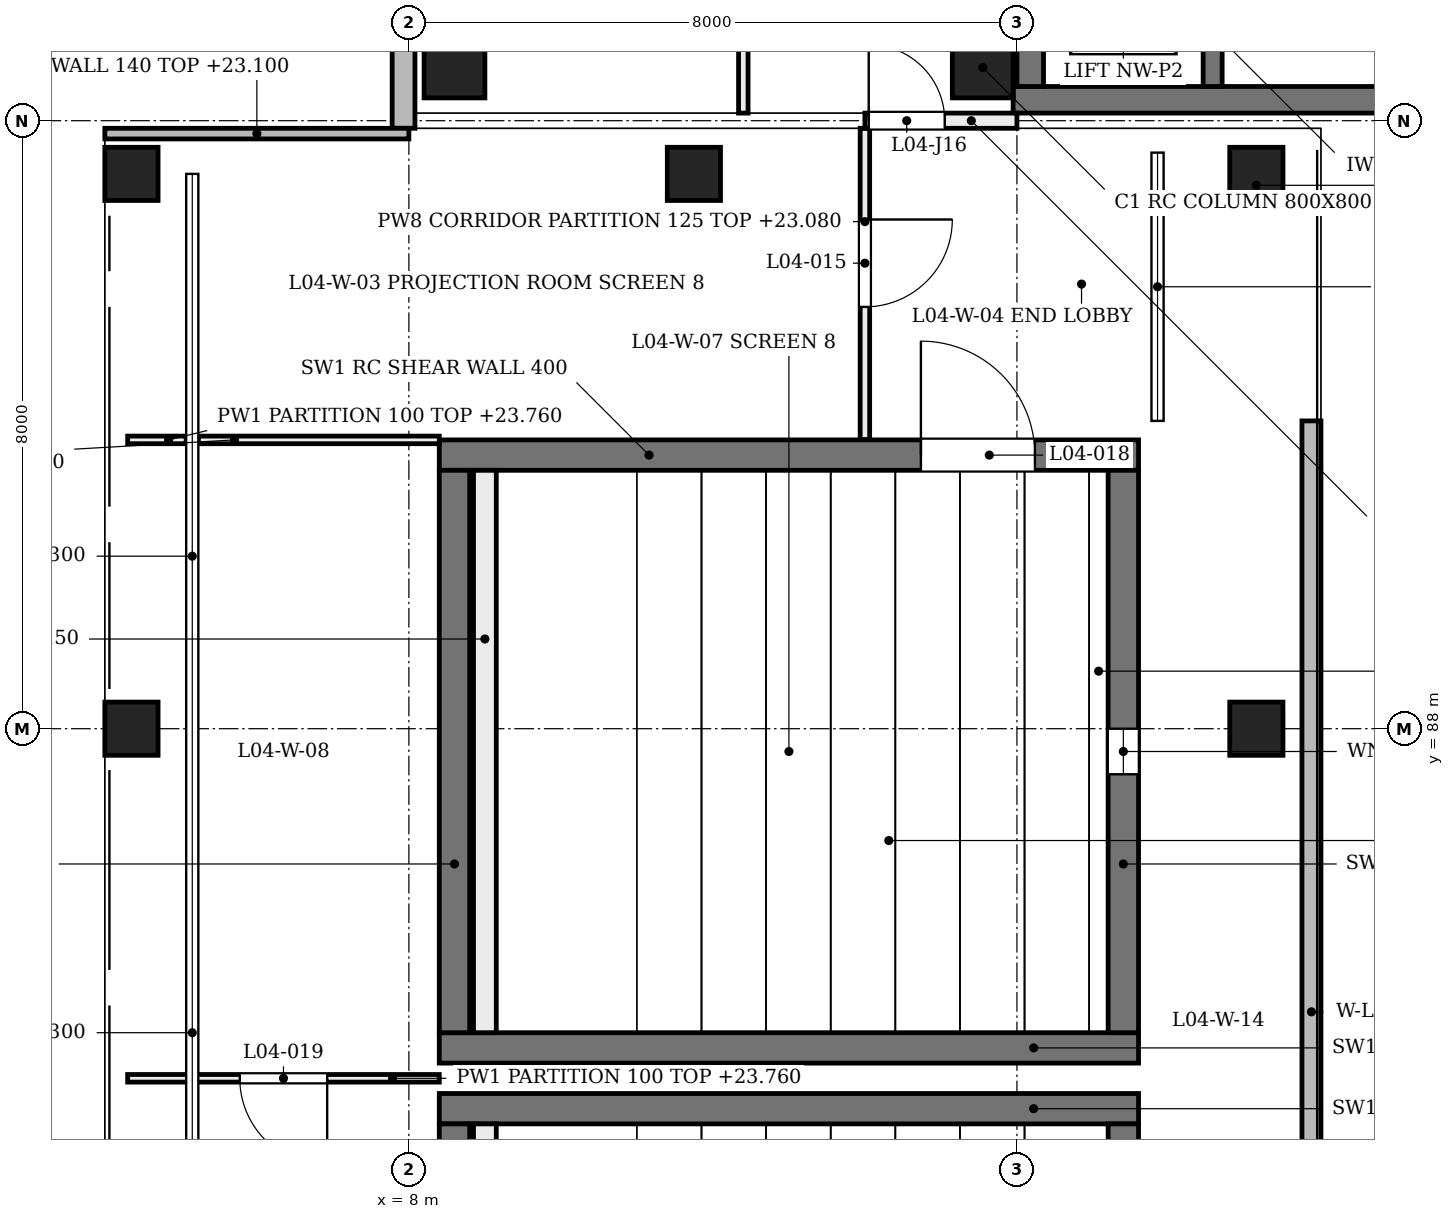
"""IFC4 building model, lengths in metres.
Left out: names, types, materials, properties, quantities, classifications, styles, units other than length and angle.
Written with IfcOpenShell. Run it as: python <this file> out.ifc"""

import sys

from ifc_helpers import new_model, si_unit, direction, frame, frame_2d, origin, origin_2d, place, context, subcontext, project, spatial, rectangle, extrude, element, fill, save


model = new_model("IFC4")
c1 = context("Model", 3, precision=1e-05, world=origin(), true_north=direction((0.0, 1.0)))
c2 = subcontext(c1, "Body", "Model", "MODEL_VIEW")
j1 = project(units=[si_unit("LENGTHUNIT", "METRE"), si_unit("PLANEANGLEUNIT", "RADIAN")], contexts=[c1])
p1 = place(None, origin())
s1 = spatial("IfcSite", under=j1, at=p1, CompositionType="ELEMENT")
p2 = place(p1, origin())
s2 = spatial("IfcBuilding", under=s1, at=p2, CompositionType="ELEMENT")
p3 = place(p2, frame((0.0, 0.0, 19.2)))
s3 = spatial("IfcBuildingStorey", under=s2, at=p3, CompositionType="ELEMENT", Elevation=19.2)
p4 = place(p3, frame((8.4, 83.0, 0.0), z_axis=(0.0, 0.0, 1.0), x_axis=(1.0, 0.0, 0.0)))
e1 = element("IfcWall", 1, at=p4, inside=s3, PredefinedType="SHEAR", context=c2, shape_type="SweptSolid", body=[
    extrude(rectangle(XDim=9.2, YDim=0.4, at=frame_2d((4.6, 0.0))), origin(), (0.0, 0.0, 1.0), 4.58),
])
p5 = place(p3, frame((8.6, 75.8, 0.0), z_axis=(0.0, 0.0, 1.0), x_axis=(0.0, 1.0, 0.0)))
e2 = element("IfcWall", 2, at=p5, inside=s3, PredefinedType="SHEAR", context=c2, shape_type="SweptSolid", body=[
    extrude(rectangle(XDim=7.0, YDim=0.4, at=frame_2d((3.5, 0.0))), origin(), (0.0, 0.0, 1.0), 4.58),
])
p6 = place(p3, frame((17.4, 75.8, 0.0), z_axis=(0.0, 0.0, 1.0), x_axis=(0.0, 1.0, 0.0)))
e3 = element("IfcWall", 3, at=p6, inside=s3, PredefinedType="SHEAR", context=c2, shape_type="SweptSolid", body=[
    extrude(rectangle(XDim=7.0, YDim=0.4, at=frame_2d((3.5, 0.0))), origin(), (0.0, 0.0, 1.0), 4.58),
])
p7 = place(p6, frame((2.252, 0.0, 0.0)))
e4 = element("IfcOpeningElement", 4, at=p7, cuts=e3, PredefinedType="OPENING", context=c2, shape_type="SweptSolid", body=[
    extrude(rectangle(XDim=1.5, YDim=2.1, at=frame_2d((0.75, 1.05))), frame((0.0, 0.21, 0.0), z_axis=(0.0, -1.0, 0.0), x_axis=(1.0, 0.0, 0.0)), (0.0, 0.0, 1.0), 0.42),
])
p8 = place(p6, frame((3.2, 0.0, 3.72)))
e5 = element("IfcOpeningElement", 5, at=p8, cuts=e3, PredefinedType="OPENING", context=c2, shape_type="SweptSolid", body=[
    extrude(rectangle(XDim=0.6, YDim=0.5, at=frame_2d((0.3, 0.25))), frame((0.0, 0.21, 0.0), z_axis=(0.0, -1.0, 0.0), x_axis=(1.0, 0.0, 0.0)), (0.0, 0.0, 1.0), 0.42),
])
p9 = place(p3, frame((8.4, 83.8, 0.0), z_axis=(0.0, 0.0, 1.0), x_axis=(1.0, 0.0, 0.0)))
e6 = element("IfcWall", 6, at=p9, inside=s3, PredefinedType="SHEAR", context=c2, shape_type="SweptSolid", body=[
    extrude(rectangle(XDim=9.2, YDim=0.4, at=frame_2d((4.6, 0.0))), origin(), (0.0, 0.0, 1.0), 4.58),
])
p10 = place(p3, frame((8.4, 91.6, 0.0), z_axis=(0.0, 0.0, 1.0), x_axis=(1.0, 0.0, 0.0)))
e7 = element("IfcWall", 7, at=p10, inside=s3, PredefinedType="SHEAR", context=c2, shape_type="SweptSolid", body=[
    extrude(rectangle(XDim=9.2, YDim=0.4, at=frame_2d((4.6, 0.0))), origin(), (0.0, 0.0, 1.0), 4.58),
])
p11 = place(p10, frame((6.337, 0.0, 0.0)))
e8 = element("IfcOpeningElement", 8, at=p11, cuts=e7, PredefinedType="OPENING", context=c2, shape_type="SweptSolid", body=[
    extrude(rectangle(XDim=1.5, YDim=2.1, at=frame_2d((0.75, 1.05))), frame((0.0, 0.21, 0.0), z_axis=(0.0, -1.0, 0.0), x_axis=(1.0, 0.0, 0.0)), (0.0, 0.0, 1.0), 0.42),
])
p12 = place(p3, frame((8.6, 84.0, 0.0), z_axis=(0.0, 0.0, 1.0), x_axis=(0.0, 1.0, 0.0)))
e9 = element("IfcWall", 9, at=p12, inside=s3, PredefinedType="SHEAR", context=c2, shape_type="SweptSolid", body=[
    extrude(rectangle(XDim=7.4, YDim=0.4, at=frame_2d((3.7, 0.0))), origin(), (0.0, 0.0, 1.0), 4.58),
])
p13 = place(p3, frame((17.4, 84.0, 0.0), z_axis=(0.0, 0.0, 1.0), x_axis=(0.0, 1.0, 0.0)))
e10 = element("IfcWall", 10, at=p13, inside=s3, PredefinedType="SHEAR", context=c2, shape_type="SweptSolid", body=[
    extrude(rectangle(XDim=7.4, YDim=0.4, at=frame_2d((3.7, 0.0))), origin(), (0.0, 0.0, 1.0), 4.58),
])
p14 = place(p13, frame((3.4, 0.0, 3.88)))
e11 = element("IfcOpeningElement", 11, at=p14, cuts=e10, PredefinedType="OPENING", context=c2, shape_type="SweptSolid", body=[
    extrude(rectangle(XDim=0.6, YDim=0.5, at=frame_2d((0.3, 0.25))), frame((0.0, 0.21, 0.0), z_axis=(0.0, -1.0, 0.0), x_axis=(1.0, 0.0, 0.0)), (0.0, 0.0, 1.0), 0.42),
])
p15 = place(p3, frame((15.95, 96.275, 0.0), z_axis=(0.0, 0.0, 1.0), x_axis=(1.0, 0.0, 0.0)))
e12 = element("IfcWall", 12, at=p15, inside=s3, PredefinedType="SHEAR", context=c2, shape_type="SweptSolid", body=[
    extrude(rectangle(XDim=7.95, YDim=0.35, at=frame_2d((3.975, 0.0))), origin(), (0.0, 0.0, 1.0), 4.58),
])
p16 = place(p3, frame((16.175, 96.45, 0.0), z_axis=(0.0, 0.0, 1.0), x_axis=(0.0, 1.0, 0.0)))
e13 = element("IfcWall", 13, at=p16, inside=s3, PredefinedType="SHEAR", context=c2, shape_type="SweptSolid", body=[
    extrude(rectangle(XDim=15.2, YDim=0.35, at=frame_2d((7.6, 0.0))), origin(), (0.0, 0.0, 1.0), 4.58),
])
p17 = place(p16, frame((13.25, 0.0, 0.0)))
e14 = element("IfcOpeningElement", 14, at=p17, cuts=e13, PredefinedType="OPENING", context=c2, shape_type="SweptSolid", body=[
    extrude(rectangle(XDim=1.0, YDim=2.1, at=frame_2d((0.5, 1.05))), frame((0.0, 0.185, 0.0), z_axis=(0.0, -1.0, 0.0), x_axis=(1.0, 0.0, 0.0)), (0.0, 0.0, 1.0), 0.37),
])
p18 = place(p16, frame((3.2, 0.0, 0.0)))
e15 = element("IfcOpeningElement", 15, at=p18, cuts=e13, PredefinedType="OPENING", context=c2, shape_type="SweptSolid", body=[
    extrude(rectangle(XDim=1.4, YDim=2.1, at=frame_2d((0.7, 1.05))), frame((0.0, 0.185, 0.0), z_axis=(0.0, -1.0, 0.0), x_axis=(1.0, 0.0, 0.0)), (0.0, 0.0, 1.0), 0.37),
])
for number, where, z_axis, x_axis in (
    (16, (8.6, 96.7, 0.0), (0.0, 0.0, 1.0), (1.0, 0.0, 0.0)),
    (17, (15.55, 96.7, 0.0), (0.0, 0.0, 1.0), (1.0, 0.0, 0.0)),
):
    element("IfcColumn", number, at=place(p3, frame(where, z_axis=z_axis, x_axis=x_axis)), inside=s3, PredefinedType="COLUMN", context=c2, shape_type="SweptSolid", body=[
        extrude(rectangle(XDim=0.8, YDim=0.8, at=origin_2d()), origin(), (0.0, 0.0, 1.0), 4.8),
    ])
for number, where, z_axis, x_axis in (
    (18, (4.6, 88.0, 0.0), (-0.204, 0.0, 0.979), (0.0, -1.0, 0.0)),
    (19, (4.6, 95.3, 0.0), (-0.204, 0.0, 0.979), (0.0, -1.0, 0.0)),
    (20, (12.0, 95.3, 0.0), (-0.204, 0.0, 0.979), (0.0, -1.0, 0.0)),
    (21, (19.4, 88.0, 0.0), (-0.204, 0.0, 0.979), (0.0, -1.0, 0.0)),
    (22, (19.4, 95.3, 0.0), (-0.204, 0.0, 0.979), (0.0, -1.0, 0.0)),
):
    element("IfcColumn", number, at=place(p3, frame(where, z_axis=z_axis, x_axis=x_axis)), inside=s3, PredefinedType="COLUMN", context=c2, shape_type="SweptSolid", body=[
        extrude(rectangle(XDim=0.7, YDim=0.7, at=origin_2d()), origin(), (0.0, 0.0, 1.0), 4.903),
    ])
p19 = place(p3, frame((5.15, 80.2, 4.1), z_axis=(0.0, 0.0, 1.0), x_axis=(0.0, 1.0, 0.0)))
e23 = element("IfcWall", 23, at=p19, inside=s3, PredefinedType="SOLIDWALL", context=c2, shape_type="SweptSolid", body=[
    extrude(rectangle(XDim=7.6, YDim=0.15, at=frame_2d((3.8, 0.0))), origin(), (0.0, 0.0, 1.0), 0.48),
])
p20 = place(p3, frame((5.15, 88.2, 4.1), z_axis=(0.0, 0.0, 1.0), x_axis=(0.0, 1.0, 0.0)))
e24 = element("IfcWall", 24, at=p20, inside=s3, PredefinedType="SOLIDWALL", context=c2, shape_type="SweptSolid", body=[
    extrude(rectangle(XDim=6.9, YDim=0.15, at=frame_2d((3.45, 0.0))), origin(), (0.0, 0.0, 1.0), 0.48),
])
p21 = place(p3, frame((19.875, 75.15, 0.0), z_axis=(0.0, 0.0, 1.0), x_axis=(0.0, 1.0, 0.0)))
e25 = element("IfcWall", 25, at=p21, inside=s3, PredefinedType="SOLIDWALL", context=c2, shape_type="SweptSolid", body=[
    extrude(rectangle(XDim=16.9, YDim=0.25, at=frame_2d((8.45, 0.0))), origin(), (0.0, 0.0, 1.0), 3.9),
])
p22 = place(p3, frame((7.93, 95.9, 0.0), z_axis=(0.0, 0.0, 1.0), x_axis=(0.0, 1.0, 0.0)))
e26 = element("IfcWall", 26, at=p22, inside=s3, PredefinedType="SOLIDWALL", context=c2, shape_type="SweptSolid", body=[
    extrude(rectangle(XDim=16.4, YDim=0.3, at=frame_2d((8.2, 0.0))), origin(), (0.0, 0.0, 1.0), 3.9),
])
p23 = place(p22, frame((1.1, 0.0, 0.75)))
e27 = element("IfcOpeningElement", 27, at=p23, cuts=e26, PredefinedType="OPENING", context=c2, shape_type="SweptSolid", body=[
    extrude(rectangle(XDim=0.9, YDim=3.1, at=frame_2d((0.45, 1.55))), frame((0.0, 0.16, 0.0), z_axis=(0.0, -1.0, 0.0), x_axis=(1.0, 0.0, 0.0)), (0.0, 0.0, 1.0), 0.32),
])
p24 = place(p22, frame((3.8, 0.0, 0.75)))
e28 = element("IfcOpeningElement", 28, at=p24, cuts=e26, PredefinedType="OPENING", context=c2, shape_type="SweptSolid", body=[
    extrude(rectangle(XDim=0.9, YDim=3.1, at=frame_2d((0.45, 1.55))), frame((0.0, 0.16, 0.0), z_axis=(0.0, -1.0, 0.0), x_axis=(1.0, 0.0, 0.0)), (0.0, 0.0, 1.0), 0.32),
])
p25 = place(p22, frame((6.5, 0.0, 0.75)))
e29 = element("IfcOpeningElement", 29, at=p25, cuts=e26, PredefinedType="OPENING", context=c2, shape_type="SweptSolid", body=[
    extrude(rectangle(XDim=0.9, YDim=3.1, at=frame_2d((0.45, 1.55))), frame((0.0, 0.16, 0.0), z_axis=(0.0, -1.0, 0.0), x_axis=(1.0, 0.0, 0.0)), (0.0, 0.0, 1.0), 0.32),
])
p26 = place(p22, frame((9.2, 0.0, 0.75)))
e30 = element("IfcOpeningElement", 30, at=p26, cuts=e26, PredefinedType="OPENING", context=c2, shape_type="SweptSolid", body=[
    extrude(rectangle(XDim=0.9, YDim=3.1, at=frame_2d((0.45, 1.55))), frame((0.0, 0.16, 0.0), z_axis=(0.0, -1.0, 0.0), x_axis=(1.0, 0.0, 0.0)), (0.0, 0.0, 1.0), 0.32),
])
p27 = place(p22, frame((11.9, 0.0, 0.75)))
e31 = element("IfcOpeningElement", 31, at=p27, cuts=e26, PredefinedType="OPENING", context=c2, shape_type="SweptSolid", body=[
    extrude(rectangle(XDim=0.9, YDim=3.1, at=frame_2d((0.45, 1.55))), frame((0.0, 0.16, 0.0), z_axis=(0.0, -1.0, 0.0), x_axis=(1.0, 0.0, 0.0)), (0.0, 0.0, 1.0), 0.32),
])
p28 = place(p22, frame((14.6, 0.0, 0.75)))
e32 = element("IfcOpeningElement", 32, at=p28, cuts=e26, PredefinedType="OPENING", context=c2, shape_type="SweptSolid", body=[
    extrude(rectangle(XDim=0.9, YDim=3.1, at=frame_2d((0.45, 1.55))), frame((0.0, 0.16, 0.0), z_axis=(0.0, -1.0, 0.0), x_axis=(1.0, 0.0, 0.0)), (0.0, 0.0, 1.0), 0.32),
])
p29 = place(p3, frame((4.0, 95.83, 0.0), z_axis=(0.0, 0.0, 1.0), x_axis=(1.0, 0.0, 0.0)))
e33 = element("IfcWall", 33, at=p29, inside=s3, PredefinedType="SOLIDWALL", context=c2, shape_type="SweptSolid", body=[
    extrude(rectangle(XDim=4.0, YDim=0.14, at=frame_2d((2.0, 0.0))), origin(), (0.0, 0.0, 1.0), 3.9),
])
p30 = place(p3, frame((18.575, 98.9, 0.0), z_axis=(0.0, 0.0, 1.0), x_axis=(0.0, -1.0, 0.0)))
e34 = element("IfcWall", 34, at=p30, inside=s3, PredefinedType="SOLIDWALL", context=c2, shape_type="SweptSolid", body=[
    extrude(rectangle(XDim=2.45, YDim=0.25, at=frame_2d((1.225, 0.0))), origin(), (0.0, 0.0, 1.0), 4.55),
])
p31 = place(p3, frame((14.0, 91.805, 0.0), z_axis=(0.0, 0.0, 1.0), x_axis=(0.0, 1.0, 0.0)))
e35 = element("IfcWall", 35, at=p31, inside=s3, PredefinedType="PARTITIONING", context=c2, shape_type="SweptSolid", body=[
    extrude(rectangle(XDim=4.095, YDim=0.125, at=frame_2d((2.047, 0.0))), origin(), (0.0, 0.0, 1.0), 3.88),
])
p32 = place(p31, frame((1.745, 0.0, 0.0)))
e36 = element("IfcOpeningElement", 36, at=p32, cuts=e35, PredefinedType="OPENING", context=c2, shape_type="SweptSolid", body=[
    extrude(rectangle(XDim=1.15, YDim=2.1, at=frame_2d((0.575, 1.05))), frame((0.0, 0.073, 0.0), z_axis=(0.0, -1.0, 0.0), x_axis=(1.0, 0.0, 0.0)), (0.0, 0.0, 1.0), 0.145),
])
p33 = place(p3, frame((4.3, 91.8, 0.0), z_axis=(0.0, 0.0, 1.0), x_axis=(1.0, 0.0, 0.0)))
e37 = element("IfcWall", 37, at=p33, inside=s3, PredefinedType="PARTITIONING", context=c2, shape_type="SweptSolid", body=[
    extrude(rectangle(XDim=0.77, YDim=0.1, at=frame_2d((0.385, 0.0))), origin(), (0.0, 0.0, 1.0), 4.56),
])
p34 = place(p3, frame((5.23, 91.8, 0.0), z_axis=(0.0, 0.0, 1.0), x_axis=(1.0, 0.0, 0.0)))
e38 = element("IfcWall", 38, at=p34, inside=s3, PredefinedType="PARTITIONING", context=c2, shape_type="SweptSolid", body=[
    extrude(rectangle(XDim=3.17, YDim=0.1, at=frame_2d((1.585, 0.0))), origin(), (0.0, 0.0, 1.0), 4.56),
])
p35 = place(p3, frame((12.4, 96.1, 0.0), z_axis=(0.0, 0.0, 1.0), x_axis=(0.0, 1.0, 0.0)))
e39 = element("IfcWall", 39, at=p35, inside=s3, PredefinedType="PARTITIONING", context=c2, shape_type="SweptSolid", body=[
    extrude(rectangle(XDim=9.567, YDim=0.125, at=frame_2d((4.783, 0.0))), origin(), (0.0, 0.0, 1.0), 3.88),
])
p36 = place(p35, frame((7.118, 0.0, 0.0)))
e40 = element("IfcOpeningElement", 40, at=p36, cuts=e39, PredefinedType="OPENING", context=c2, shape_type="SweptSolid", body=[
    extrude(rectangle(XDim=1.0, YDim=2.1, at=frame_2d((0.5, 1.05))), frame((0.0, 0.073, 0.0), z_axis=(0.0, -1.0, 0.0), x_axis=(1.0, 0.0, 0.0)), (0.0, 0.0, 1.0), 0.145),
])
p37 = place(p35, frame((2.303, 0.0, 0.0)))
e41 = element("IfcOpeningElement", 41, at=p37, cuts=e39, PredefinedType="OPENING", context=c2, shape_type="SweptSolid", body=[
    extrude(rectangle(XDim=1.0, YDim=2.1, at=frame_2d((0.5, 1.05))), frame((0.0, 0.073, 0.0), z_axis=(0.0, -1.0, 0.0), x_axis=(1.0, 0.0, 0.0)), (0.0, 0.0, 1.0), 0.145),
])
p38 = place(p3, frame((4.3, 83.4, 0.0), z_axis=(0.0, 0.0, 1.0), x_axis=(1.0, 0.0, 0.0)))
e42 = element("IfcWall", 42, at=p38, inside=s3, PredefinedType="PARTITIONING", context=c2, shape_type="SweptSolid", body=[
    extrude(rectangle(XDim=4.1, YDim=0.1, at=frame_2d((2.05, 0.0))), origin(), (0.0, 0.0, 1.0), 4.56),
])
p39 = place(p38, frame((1.475, 0.0, 0.0)))
e43 = element("IfcOpeningElement", 43, at=p39, cuts=e42, PredefinedType="OPENING", context=c2, shape_type="SweptSolid", body=[
    extrude(rectangle(XDim=1.15, YDim=2.1, at=frame_2d((0.575, 1.05))), frame((0.0, 0.06, 0.0), z_axis=(0.0, -1.0, 0.0), x_axis=(1.0, 0.0, 0.0)), (0.0, 0.0, 1.0), 0.12),
])
p40 = place(p3, frame((14.0, 96.0, 0.0), z_axis=(0.0, 0.0, 1.0), x_axis=(1.0, 0.0, 0.0)))
e44 = element("IfcWall", 44, at=p40, inside=s3, PredefinedType="PARTITIONING", context=c2, shape_type="SweptSolid", body=[
    extrude(rectangle(XDim=2.0, YDim=0.2, at=frame_2d((1.0, 0.0))), origin(), (0.0, 0.0, 1.0), 3.88),
])
p41 = place(p40, frame((0.05, 0.0, 0.0)))
e45 = element("IfcOpeningElement", 45, at=p41, cuts=e44, PredefinedType="OPENING", context=c2, shape_type="SweptSolid", body=[
    extrude(rectangle(XDim=1.0, YDim=2.1, at=frame_2d((0.5, 1.05))), frame((0.0, 0.11, 0.0), z_axis=(0.0, -1.0, 0.0), x_axis=(1.0, 0.0, 0.0)), (0.0, 0.0, 1.0), 0.22),
])
p42 = place(p3, frame((9.0, 75.8, 0.0), z_axis=(0.0, 0.0, 1.0), x_axis=(0.0, 1.0, 0.0)))
e46 = element("IfcWall", 46, at=p42, inside=s3, PredefinedType="PARTITIONING", context=c2, shape_type="SweptSolid", body=[
    extrude(rectangle(XDim=7.0, YDim=0.3, at=frame_2d((3.5, 0.0))), origin(), (0.0, 0.0, 1.0), 6.95),
])
p43 = place(p3, frame((9.0, 84.0, 0.0), z_axis=(0.0, 0.0, 1.0), x_axis=(0.0, 1.0, 0.0)))
e47 = element("IfcWall", 47, at=p43, inside=s3, PredefinedType="PARTITIONING", context=c2, shape_type="SweptSolid", body=[
    extrude(rectangle(XDim=7.4, YDim=0.3, at=frame_2d((3.7, 0.0))), origin(), (0.0, 0.0, 1.0), 6.95),
])
p44 = place(p32, origin())
e48 = element("IfcDoor", 48, at=p44, inside=s3, OperationType="SINGLE_SWING_RIGHT", PredefinedType="DOOR", context=c2, shape_type="SweptSolid", body=[
    extrude(rectangle(XDim=1.15, YDim=2.1, at=frame_2d((0.575, 1.05))), frame((0.0, 0.025, 0.0), z_axis=(0.0, -1.0, 0.0), x_axis=(1.0, 0.0, 0.0)), (0.0, 0.0, 1.0), 0.05),
])
fill(e36, e48)
p45 = place(p11, origin())
e49 = element("IfcDoor", 49, at=p45, inside=s3, OperationType="SINGLE_SWING_LEFT", PredefinedType="DOOR", context=c2, shape_type="SweptSolid", body=[
    extrude(rectangle(XDim=1.5, YDim=2.1, at=frame_2d((0.75, 1.05))), frame((0.0, 0.025, 0.0), z_axis=(0.0, -1.0, 0.0), x_axis=(1.0, 0.0, 0.0)), (0.0, 0.0, 1.0), 0.05),
])
fill(e8, e49)
p46 = place(p39, origin())
e50 = element("IfcDoor", 50, at=p46, inside=s3, OperationType="SINGLE_SWING_RIGHT", PredefinedType="DOOR", context=c2, shape_type="SweptSolid", body=[
    extrude(rectangle(XDim=1.15, YDim=2.1, at=frame_2d((0.575, 1.05))), frame((0.0, 0.025, 0.0), z_axis=(0.0, -1.0, 0.0), x_axis=(1.0, 0.0, 0.0)), (0.0, 0.0, 1.0), 0.05),
])
fill(e43, e50)
p47 = place(p41, origin())
e51 = element("IfcDoor", 51, at=p47, inside=s3, OperationType="SINGLE_SWING_LEFT", PredefinedType="DOOR", context=c2, shape_type="SweptSolid", body=[
    extrude(rectangle(XDim=1.0, YDim=2.1, at=frame_2d((0.5, 1.05))), frame((0.0, 0.025, 0.0), z_axis=(0.0, -1.0, 0.0), x_axis=(1.0, 0.0, 0.0)), (0.0, 0.0, 1.0), 0.05),
])
fill(e45, e51)
p48 = place(p14, origin())
e52 = element("IfcWindow", 52, at=p48, inside=s3, PartitioningType="SINGLE_PANEL", PredefinedType="WINDOW", context=c2, shape_type="SweptSolid", body=[
    extrude(rectangle(XDim=0.6, YDim=0.5, at=frame_2d((0.3, 0.25))), frame((0.0, 0.03, 0.0), z_axis=(0.0, -1.0, 0.0), x_axis=(1.0, 0.0, 0.0)), (0.0, 0.0, 1.0), 0.06),
])
fill(e11, e52)
save(model, sys.argv[1])
